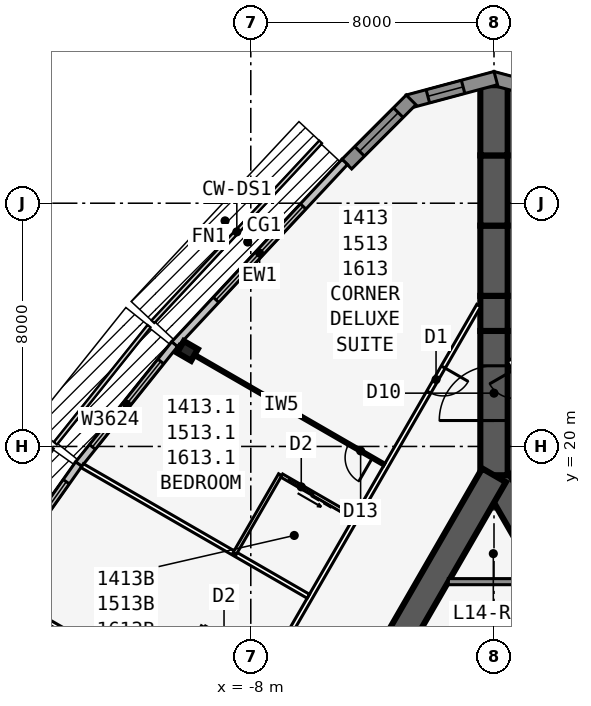
"""IFC4 building model, lengths in metres.
Left out: names, types, materials, properties, quantities, classifications, styles, units other than length and angle.
Written with IfcOpenShell. Run it as: python <this file> out.ifc"""

import sys

from ifc_helpers import new_model, si_unit, direction, frame, frame_2d, origin, origin_2d, place, context, subcontext, project, spatial, polyline, rectangle, i_section, outline, extrude, element, fill, save


model = new_model("IFC4")
c1 = context("Model", 3, precision=1e-05, world=origin(), true_north=direction((0.0, 1.0)))
c2 = subcontext(c1, "Body", "Model", "MODEL_VIEW")
j1 = project(units=[si_unit("LENGTHUNIT", "METRE"), si_unit("PLANEANGLEUNIT", "RADIAN")], contexts=[c1])
p1 = place(None, origin())
s1 = spatial("IfcSite", under=j1, at=p1, CompositionType="ELEMENT")
p2 = place(p1, origin())
s2 = spatial("IfcBuilding", under=s1, at=p2, CompositionType="ELEMENT")
p3 = place(p2, frame((0.0, 0.0, 59.1)))
s3 = spatial("IfcBuildingStorey", under=s2, at=p3, CompositionType="ELEMENT", Elevation=59.1)
p4 = place(p3, frame((16.5, -9.526, 0.0), z_axis=(0.0, 0.0, 1.0), x_axis=(-0.499999749417, 0.866025548458, 0.0)))
e1 = element("IfcWall", 1, at=p4, inside=s3, PredefinedType="SHEAR", context=c2, shape_type="SweptSolid", body=[
    extrude(rectangle(XDim=33.0, YDim=0.9, at=frame_2d((16.5, 0.0))), origin(), (0.0, 0.0, 1.0), 3.4),
])
p5 = place(p4, frame((14.15, 0.0, 0.0)))
e2 = element("IfcOpeningElement", 2, at=p5, cuts=e1, PredefinedType="OPENING", context=c2, shape_type="SweptSolid", body=[
    extrude(rectangle(XDim=1.8, YDim=2.13, at=frame_2d((0.9, 1.065))), frame((0.0, 0.46, 0.0), z_axis=(0.0, -1.0, 0.0), x_axis=(1.0, 0.0, 0.0)), (0.0, 0.0, 1.0), 0.92),
])
p6 = place(p4, frame((12.6, 0.0, 0.0)))
e3 = element("IfcOpeningElement", 3, at=p6, cuts=e1, PredefinedType="OPENING", context=c2, shape_type="SweptSolid", body=[
    extrude(rectangle(XDim=1.0, YDim=2.13, at=frame_2d((0.5, 1.065))), frame((0.0, 0.46, 0.0), z_axis=(0.0, -1.0, 0.0), x_axis=(1.0, 0.0, 0.0)), (0.0, 0.0, 1.0), 0.92),
])
p7 = place(p3, frame((0.0, 19.052, 0.0), z_axis=(0.0, 0.0, 1.0), x_axis=(-0.499999749417, -0.866025548458, 0.0)))
e4 = element("IfcWall", 4, at=p7, inside=s3, PredefinedType="SHEAR", context=c2, shape_type="SweptSolid", body=[
    extrude(rectangle(XDim=33.0, YDim=0.9, at=frame_2d((16.5, 0.0))), origin(), (0.0, 0.0, 1.0), 3.4),
])
p8 = place(p7, frame((14.15, 0.0, 0.0)))
e5 = element("IfcOpeningElement", 5, at=p8, cuts=e4, PredefinedType="OPENING", context=c2, shape_type="SweptSolid", body=[
    extrude(rectangle(XDim=1.8, YDim=2.13, at=frame_2d((0.9, 1.065))), frame((0.0, 0.46, 0.0), z_axis=(0.0, -1.0, 0.0), x_axis=(1.0, 0.0, 0.0)), (0.0, 0.0, 1.0), 0.92),
])
p9 = place(p7, frame((12.6, 0.0, 0.0)))
e6 = element("IfcOpeningElement", 6, at=p9, cuts=e4, PredefinedType="OPENING", context=c2, shape_type="SweptSolid", body=[
    extrude(rectangle(XDim=1.0, YDim=2.13, at=frame_2d((0.5, 1.065))), frame((0.0, 0.46, 0.0), z_axis=(0.0, -1.0, 0.0), x_axis=(1.0, 0.0, 0.0)), (0.0, 0.0, 1.0), 0.92),
])
p10 = place(p3, frame((0.0, 19.052, 0.0), z_axis=(0.0, 0.0, 1.0), x_axis=(0.0, 1.0, 0.0)))
e7 = element("IfcWall", 7, at=p10, inside=s3, PredefinedType="SHEAR", context=c2, shape_type="SweptSolid", body=[
    extrude(rectangle(XDim=4.746, YDim=0.9, at=frame_2d((2.373, 0.0))), origin(), (0.0, 0.0, 1.0), 3.4),
])
p11 = place(p10, frame((1.8, 0.0, 0.0)))
e8 = element("IfcOpeningElement", 8, at=p11, cuts=e7, PredefinedType="OPENING", context=c2, shape_type="SweptSolid", body=[
    extrude(rectangle(XDim=1.8, YDim=2.13, at=frame_2d((0.9, 1.065))), frame((0.0, 0.46, 0.0), z_axis=(0.0, -1.0, 0.0), x_axis=(1.0, 0.0, 0.0)), (0.0, 0.0, 1.0), 0.92),
])
p12 = place(p3, frame((0.0, 23.799, 0.0), z_axis=(0.0, 0.0, 1.0), x_axis=(0.0, 1.0, 0.0)))
e9 = element("IfcWall", 9, at=p12, inside=s3, PredefinedType="SHEAR", context=c2, shape_type="SweptSolid", body=[
    extrude(rectangle(XDim=1.155, YDim=0.9, at=frame_2d((0.577, 0.0))), origin(), (0.0, 0.0, 1.0), 3.4),
])
p13 = place(p3, frame((0.0, 24.953, 0.0), z_axis=(0.0, 0.0, 1.0), x_axis=(0.0, 1.0, 0.0)))
e10 = element("IfcWall", 10, at=p13, inside=s3, PredefinedType="SHEAR", context=c2, shape_type="SweptSolid", body=[
    extrude(rectangle(XDim=2.309, YDim=0.9, at=frame_2d((1.155, 0.0))), origin(), (0.0, 0.0, 1.0), 3.4),
])
p14 = place(p3, frame((0.0, 27.263, 0.0), z_axis=(0.0, 0.0, 1.0), x_axis=(0.0, 1.0, 0.0)))
e11 = element("IfcWall", 11, at=p14, inside=s3, PredefinedType="SHEAR", context=c2, shape_type="SweptSolid", body=[
    extrude(rectangle(XDim=2.31, YDim=0.9, at=frame_2d((1.155, 0.0))), origin(), (0.0, 0.0, 1.0), 3.4),
])
p15 = place(p3, frame((0.0, 29.572, 0.0), z_axis=(0.0, 0.0, 1.0), x_axis=(0.0, 1.0, 0.0)))
e12 = element("IfcWall", 12, at=p15, inside=s3, PredefinedType="SHEAR", context=c2, shape_type="SweptSolid", body=[
    extrude(rectangle(XDim=2.309, YDim=0.9, at=frame_2d((1.155, 0.0))), origin(), (0.0, 0.0, 1.0), 3.4),
])
p16 = place(p3, frame((-10.083, 23.142, 0.0), z_axis=(0.0, 0.0, 1.0), x_axis=(-0.5, -0.866025403784, 0.0)))
e13 = element("IfcColumn", 13, at=p16, inside=s3, PredefinedType="COLUMN", context=c2, shape_type="SweptSolid", body=[
    extrude(i_section(OverallWidth=0.442, OverallDepth=0.531, WebThickness=0.066, FlangeThickness=0.106, at=origin_2d()), origin(), (0.0, 0.0, 1.0), 3.4),
])
p17 = place(p3, frame((2.829, 31.341, 0.0), z_axis=(0.0, 0.0, 1.0), x_axis=(-0.965930548995, 0.258801419081, 0.0)))
e14 = element("IfcWall", 14, at=p17, inside=s3, PredefinedType="SOLIDWALL", context=c2, shape_type="SweptSolid", body=[
    extrude(outline(polyline([(2.989, 0.225), (2.929, 0.225), (2.438, 0.093), (2.402, 0.225), (0.0, 0.225), (0.0, -0.225), (2.989, -0.225), (2.989, 0.225)])), origin(), (0.0, 0.0, 1.0), 3.235),
])
p18 = place(p17, frame((0.676, 0.0, 0.45)))
e15 = element("IfcOpeningElement", 15, at=p18, cuts=e14, PredefinedType="OPENING", context=c2, shape_type="SweptSolid", body=[
    extrude(rectangle(XDim=1.2, YDim=2.4, at=frame_2d((0.6, 1.2))), frame((0.0, 0.235, 0.0), z_axis=(0.0, -1.0, 0.0), x_axis=(1.0, 0.0, 0.0)), (0.0, 0.0, 1.0), 0.47),
])
p19 = place(p3, frame((0.058, 32.114, 0.0), z_axis=(0.0, 0.0, 1.0), x_axis=(-0.965930548995, -0.258801419081, 0.0)))
e16 = element("IfcWall", 16, at=p19, inside=s3, PredefinedType="SOLIDWALL", context=c2, shape_type="SweptSolid", body=[
    extrude(outline(polyline([(2.989, 0.225), (0.586, 0.225), (0.551, 0.093), (0.059, 0.225), (0.0, 0.225), (0.0, -0.225), (2.989, -0.225), (2.989, 0.225)])), origin(), (0.0, 0.0, 1.0), 3.235),
])
p20 = place(p19, frame((1.113, 0.0, 0.45)))
e17 = element("IfcOpeningElement", 17, at=p20, cuts=e16, PredefinedType="OPENING", context=c2, shape_type="SweptSolid", body=[
    extrude(rectangle(XDim=1.2, YDim=2.4, at=frame_2d((0.6, 1.2))), frame((0.0, 0.235, 0.0), z_axis=(0.0, -1.0, 0.0), x_axis=(1.0, 0.0, 0.0)), (0.0, 0.0, 1.0), 0.47),
])
p21 = place(p3, frame((-2.728, 31.399, 0.0), z_axis=(0.0, 0.0, 1.0), x_axis=(-0.707106781187, -0.707106781187, 0.0)))
e18 = element("IfcWall", 18, at=p21, inside=s3, PredefinedType="SOLIDWALL", context=c2, shape_type="SweptSolid", body=[
    extrude(rectangle(XDim=2.988, YDim=0.45, at=frame_2d((1.494, 0.0))), origin(), (0.0, 0.0, 1.0), 3.235),
])
p22 = place(p21, frame((0.594, 0.0, 0.45)))
e19 = element("IfcOpeningElement", 19, at=p22, cuts=e18, PredefinedType="OPENING", context=c2, shape_type="SweptSolid", body=[
    extrude(rectangle(XDim=1.8, YDim=2.4, at=frame_2d((0.9, 1.2))), frame((0.0, 0.235, 0.0), z_axis=(0.0, -1.0, 0.0), x_axis=(1.0, 0.0, 0.0)), (0.0, 0.0, 1.0), 0.47),
])
p23 = place(p3, frame((-4.909, 29.36, 0.0), z_axis=(0.0, 0.0, 1.0), x_axis=(-0.682289646561, -0.731081964075, 0.0)))
e20 = element("IfcWall", 20, at=p23, inside=s3, PredefinedType="STANDARD", context=c2, shape_type="SweptSolid", body=[
    extrude(rectangle(XDim=8.211, YDim=0.25, at=frame_2d((4.105, 0.0))), origin(), (0.0, 0.0, 1.0), 3.235),
])
p24 = place(p23, frame((2.006, 0.0, 0.45)))
e21 = element("IfcOpeningElement", 21, at=p24, cuts=e20, PredefinedType="OPENING", context=c2, shape_type="SweptSolid", body=[
    extrude(rectangle(XDim=4.2, YDim=2.4, at=frame_2d((2.1, 1.2))), frame((0.0, 0.135, 0.0), z_axis=(0.0, -1.0, 0.0), x_axis=(1.0, 0.0, 0.0)), (0.0, 0.0, 1.0), 0.27),
])
p25 = place(p3, frame((-10.505, 23.364, 0.0), z_axis=(0.0, 0.0, 1.0), x_axis=(-0.624594965756, -0.780948864364, 0.0)))
e22 = element("IfcWall", 22, at=p25, inside=s3, PredefinedType="STANDARD", context=c2, shape_type="SweptSolid", body=[
    extrude(rectangle(XDim=5.058, YDim=0.25, at=frame_2d((2.529, 0.0))), origin(), (0.0, 0.0, 1.0), 3.235),
])
p26 = place(p25, frame((0.729, 0.0, 0.45)))
e23 = element("IfcOpeningElement", 23, at=p26, cuts=e22, PredefinedType="OPENING", context=c2, shape_type="SweptSolid", body=[
    extrude(rectangle(XDim=3.6, YDim=2.4, at=frame_2d((1.8, 1.2))), frame((0.0, 0.135, 0.0), z_axis=(0.0, -1.0, 0.0), x_axis=(1.0, 0.0, 0.0)), (0.0, 0.0, 1.0), 0.27),
])
p27 = place(p3, frame((-13.659, 19.42, 0.0), z_axis=(0.0, 0.0, 1.0), x_axis=(-0.5766431066, -0.81699616132, 0.0)))
e24 = element("IfcWall", 24, at=p27, inside=s3, PredefinedType="STANDARD", context=c2, shape_type="SweptSolid", body=[
    extrude(rectangle(XDim=5.021, YDim=0.25, at=frame_2d((2.51, 0.0))), origin(), (0.0, 0.0, 1.0), 3.235),
])
p28 = place(p27, frame((0.71, 0.0, 0.45)))
e25 = element("IfcOpeningElement", 25, at=p28, cuts=e24, PredefinedType="OPENING", context=c2, shape_type="SweptSolid", body=[
    extrude(rectangle(XDim=3.6, YDim=2.4, at=frame_2d((1.8, 1.2))), frame((0.0, 0.135, 0.0), z_axis=(0.0, -1.0, 0.0), x_axis=(1.0, 0.0, 0.0)), (0.0, 0.0, 1.0), 0.27),
])
p29 = place(p3, frame((20.027, -10.985, 0.0), z_axis=(0.0, 0.0, 1.0), x_axis=(-0.500001677587, 0.866024435227, 0.0)))
e26 = element("IfcWall", 26, at=p29, inside=s3, PredefinedType="PARTITIONING", context=c2, shape_type="SweptSolid", body=[
    extrude(rectangle(XDim=39.054, YDim=0.15, at=frame_2d((19.527, 0.0))), origin(), (0.0, 0.0, 1.0), 3.235),
])
p30 = place(p29, frame((0.352, 0.0, 0.0)))
e27 = element("IfcOpeningElement", 27, at=p30, cuts=e26, PredefinedType="OPENING", context=c2, shape_type="SweptSolid", body=[
    extrude(rectangle(XDim=0.95, YDim=2.13, at=frame_2d((0.475, 1.065))), frame((0.0, 0.085, 0.0), z_axis=(0.0, -1.0, 0.0), x_axis=(1.0, 0.0, 0.0)), (0.0, 0.0, 1.0), 0.17),
])
p31 = place(p29, frame((10.352, 0.0, 0.0)))
e28 = element("IfcOpeningElement", 28, at=p31, cuts=e26, PredefinedType="OPENING", context=c2, shape_type="SweptSolid", body=[
    extrude(rectangle(XDim=0.95, YDim=2.13, at=frame_2d((0.475, 1.065))), frame((0.0, 0.085, 0.0), z_axis=(0.0, -1.0, 0.0), x_axis=(1.0, 0.0, 0.0)), (0.0, 0.0, 1.0), 0.17),
])
p32 = place(p29, frame((17.152, 0.0, 0.0)))
e29 = element("IfcOpeningElement", 29, at=p32, cuts=e26, PredefinedType="OPENING", context=c2, shape_type="SweptSolid", body=[
    extrude(rectangle(XDim=0.95, YDim=2.13, at=frame_2d((0.475, 1.065))), frame((0.0, 0.085, 0.0), z_axis=(0.0, -1.0, 0.0), x_axis=(1.0, 0.0, 0.0)), (0.0, 0.0, 1.0), 0.17),
])
p33 = place(p29, frame((20.952, 0.0, 0.0)))
e30 = element("IfcOpeningElement", 30, at=p33, cuts=e26, PredefinedType="OPENING", context=c2, shape_type="SweptSolid", body=[
    extrude(rectangle(XDim=0.95, YDim=2.13, at=frame_2d((0.475, 1.065))), frame((0.0, 0.085, 0.0), z_axis=(0.0, -1.0, 0.0), x_axis=(1.0, 0.0, 0.0)), (0.0, 0.0, 1.0), 0.17),
])
p34 = place(p29, frame((27.752, 0.0, 0.0)))
e31 = element("IfcOpeningElement", 31, at=p34, cuts=e26, PredefinedType="OPENING", context=c2, shape_type="SweptSolid", body=[
    extrude(rectangle(XDim=0.95, YDim=2.13, at=frame_2d((0.475, 1.065))), frame((0.0, 0.085, 0.0), z_axis=(0.0, -1.0, 0.0), x_axis=(1.0, 0.0, 0.0)), (0.0, 0.0, 1.0), 0.17),
])
p35 = place(p29, frame((37.752, 0.0, 0.0)))
e32 = element("IfcOpeningElement", 32, at=p35, cuts=e26, PredefinedType="OPENING", context=c2, shape_type="SweptSolid", body=[
    extrude(rectangle(XDim=0.95, YDim=2.13, at=frame_2d((0.475, 1.065))), frame((0.0, 0.085, 0.0), z_axis=(0.0, -1.0, 0.0), x_axis=(1.0, 0.0, 0.0)), (0.0, 0.0, 1.0), 0.17),
])
p36 = place(p3, frame((-0.5, 24.636, 0.0), z_axis=(0.0, 0.0, 1.0), x_axis=(-0.500001915564, -0.86602429783, 0.0)))
e33 = element("IfcWall", 33, at=p36, inside=s3, PredefinedType="PARTITIONING", context=c2, shape_type="SweptSolid", body=[
    extrude(rectangle(XDim=42.172, YDim=0.15, at=frame_2d((21.086, 0.0))), origin(), (0.0, 0.0, 1.0), 3.235),
])
p37 = place(p36, frame((2.338, 0.0, 0.0)))
e34 = element("IfcOpeningElement", 34, at=p37, cuts=e33, PredefinedType="OPENING", context=c2, shape_type="SweptSolid", body=[
    extrude(rectangle(XDim=0.95, YDim=2.13, at=frame_2d((0.475, 1.065))), frame((0.0, 0.085, 0.0), z_axis=(0.0, -1.0, 0.0), x_axis=(1.0, 0.0, 0.0)), (0.0, 0.0, 1.0), 0.17),
])
p38 = place(p36, frame((12.511, 0.0, 0.0)))
e35 = element("IfcOpeningElement", 35, at=p38, cuts=e33, PredefinedType="OPENING", context=c2, shape_type="SweptSolid", body=[
    extrude(rectangle(XDim=0.95, YDim=2.13, at=frame_2d((0.475, 1.065))), frame((0.0, 0.085, 0.0), z_axis=(0.0, -1.0, 0.0), x_axis=(1.0, 0.0, 0.0)), (0.0, 0.0, 1.0), 0.17),
])
p39 = place(p36, frame((19.311, 0.0, 0.0)))
e36 = element("IfcOpeningElement", 36, at=p39, cuts=e33, PredefinedType="OPENING", context=c2, shape_type="SweptSolid", body=[
    extrude(rectangle(XDim=0.95, YDim=2.13, at=frame_2d((0.475, 1.065))), frame((0.0, 0.085, 0.0), z_axis=(0.0, -1.0, 0.0), x_axis=(1.0, 0.0, 0.0)), (0.0, 0.0, 1.0), 0.17),
])
p40 = place(p36, frame((28.111, 0.0, 0.0)))
e37 = element("IfcOpeningElement", 37, at=p40, cuts=e33, PredefinedType="OPENING", context=c2, shape_type="SweptSolid", body=[
    extrude(rectangle(XDim=0.95, YDim=2.13, at=frame_2d((0.475, 1.065))), frame((0.0, 0.085, 0.0), z_axis=(0.0, -1.0, 0.0), x_axis=(1.0, 0.0, 0.0)), (0.0, 0.0, 1.0), 0.17),
])
p41 = place(p36, frame((39.311, 0.0, 0.0)))
e38 = element("IfcOpeningElement", 38, at=p41, cuts=e33, PredefinedType="OPENING", context=c2, shape_type="SweptSolid", body=[
    extrude(rectangle(XDim=0.95, YDim=2.13, at=frame_2d((0.475, 1.065))), frame((0.0, 0.085, 0.0), z_axis=(0.0, -1.0, 0.0), x_axis=(1.0, 0.0, 0.0)), (0.0, 0.0, 1.0), 0.17),
])
p42 = place(p3, frame((-3.608, 19.404, 0.0), z_axis=(0.0, 0.0, 1.0), x_axis=(-0.866021300503, 0.500007107024, 0.0)))
e39 = element("IfcWall", 39, at=p42, inside=s3, PredefinedType="PARTITIONING", context=c2, shape_type="SweptSolid", body=[
    extrude(rectangle(XDim=7.82, YDim=0.1, at=frame_2d((3.91, 0.0))), origin(), (0.0, 0.0, 1.0), 2.389),
])
p43 = place(p42, frame((0.45, 0.0, 0.0)))
e40 = element("IfcOpeningElement", 40, at=p43, cuts=e39, PredefinedType="OPENING", context=c2, shape_type="SweptSolid", body=[
    extrude(rectangle(XDim=0.9, YDim=2.13, at=frame_2d((0.45, 1.065))), frame((0.0, 0.06, 0.0), z_axis=(0.0, -1.0, 0.0), x_axis=(1.0, 0.0, 0.0)), (0.0, 0.0, 1.0), 0.12),
])
p44 = place(p3, frame((-6.108, 15.073, 0.0), z_axis=(0.0, 0.0, 1.0), x_axis=(-0.866031196456, 0.499989966665, 0.0)))
e41 = element("IfcWall", 41, at=p44, inside=s3, PredefinedType="PARTITIONING", context=c2, shape_type="SweptSolid", body=[
    extrude(rectangle(XDim=8.585, YDim=0.15, at=frame_2d((4.292, 0.0))), origin(), (0.0, 0.0, 1.0), 2.389),
])
p45 = place(p3, frame((-8.608, 10.743, 0.0), z_axis=(0.0, 0.0, 1.0), x_axis=(-0.866028232062, 0.499995101247, 0.0)))
e42 = element("IfcWall", 42, at=p45, inside=s3, PredefinedType="PARTITIONING", context=c2, shape_type="SweptSolid", body=[
    extrude(rectangle(XDim=9.043, YDim=0.15, at=frame_2d((4.521, 0.0))), origin(), (0.0, 0.0, 1.0), 2.389),
])
p46 = place(p3, frame((-7.033, 19.072, 0.0), z_axis=(0.0, 0.0, 1.0), x_axis=(-0.499990139034, -0.866031096941, 0.0)))
e43 = element("IfcWall", 43, at=p46, inside=s3, PredefinedType="PLUMBINGWALL", context=c2, shape_type="SweptSolid", body=[
    extrude(rectangle(XDim=3.0, YDim=0.12, at=frame_2d((1.5, 0.0))), origin(), (0.0, 0.0, 1.0), 3.235),
])
p47 = place(p3, frame((-4.608, 17.671, 0.0), z_axis=(0.0, 0.0, 1.0), x_axis=(-0.865997131366, 0.500048966069, 0.0)))
e44 = element("IfcWall", 44, at=p47, inside=s3, PredefinedType="PLUMBINGWALL", context=c2, shape_type="SweptSolid", body=[
    extrude(rectangle(XDim=2.74, YDim=0.12, at=frame_2d((1.37, 0.0))), origin(), (0.0, 0.0, 1.0), 3.235),
])
p48 = place(p47, frame((1.55, 0.0, 0.0)))
e45 = element("IfcOpeningElement", 45, at=p48, cuts=e44, PredefinedType="OPENING", context=c2, shape_type="SweptSolid", body=[
    extrude(rectangle(XDim=0.9, YDim=2.13, at=frame_2d((0.45, 1.065))), frame((0.0, 0.07, 0.0), z_axis=(0.0, -1.0, 0.0), x_axis=(1.0, 0.0, 0.0)), (0.0, 0.0, 1.0), 0.14),
])
p49 = place(p3, frame((-9.573, 14.072, 0.0), z_axis=(0.0, 0.0, 1.0), x_axis=(-0.500001309137, -0.866024647952, 0.0)))
e46 = element("IfcWall", 46, at=p49, inside=s3, PredefinedType="PLUMBINGWALL", context=c2, shape_type="SweptSolid", body=[
    extrude(rectangle(XDim=2.4, YDim=0.12, at=frame_2d((1.2, 0.0))), origin(), (0.0, 0.0, 1.0), 3.235),
])
p50 = place(p3, frame((-7.408, 12.822, 0.0), z_axis=(0.0, 0.0, 1.0), x_axis=(-0.866023955769, 0.500002508028, 0.0)))
e47 = element("IfcWall", 47, at=p50, inside=s3, PredefinedType="PLUMBINGWALL", context=c2, shape_type="SweptSolid", body=[
    extrude(rectangle(XDim=2.44, YDim=0.12, at=frame_2d((1.22, 0.0))), origin(), (0.0, 0.0, 1.0), 3.235),
])
p51 = place(p50, frame((1.25, 0.0, 0.0)))
e48 = element("IfcOpeningElement", 48, at=p51, cuts=e47, PredefinedType="OPENING", context=c2, shape_type="SweptSolid", body=[
    extrude(rectangle(XDim=0.9, YDim=2.13, at=frame_2d((0.45, 1.065))), frame((0.0, 0.07, 0.0), z_axis=(0.0, -1.0, 0.0), x_axis=(1.0, 0.0, 0.0)), (0.0, 0.0, 1.0), 0.14),
])
p52 = place(p3, frame((-1.501, 15.552, 0.0), z_axis=(0.0, 0.0, 1.0), x_axis=(1.0, 0.0, 0.0)))
e49 = element("IfcWall", 49, at=p52, inside=s3, PredefinedType="SOLIDWALL", context=c2, shape_type="SweptSolid", body=[
    extrude(rectangle(XDim=3.002, YDim=0.2, at=frame_2d((1.501, 0.0))), origin(), (0.0, 0.0, 1.0), 3.235),
])
p53 = place(p20, origin())
e50 = element("IfcWindow", 50, at=p53, inside=s3, PartitioningType="SINGLE_PANEL", PredefinedType="WINDOW", context=c2, shape_type="SweptSolid", body=[
    extrude(rectangle(XDim=1.2, YDim=2.4, at=frame_2d((0.6, 1.2))), frame((0.0, 0.03, 0.0), z_axis=(0.0, -1.0, 0.0), x_axis=(1.0, 0.0, 0.0)), (0.0, 0.0, 1.0), 0.06),
])
fill(e17, e50)
p54 = place(p22, origin())
e51 = element("IfcWindow", 51, at=p54, inside=s3, PartitioningType="SINGLE_PANEL", PredefinedType="WINDOW", context=c2, shape_type="SweptSolid", body=[
    extrude(rectangle(XDim=1.8, YDim=2.4, at=frame_2d((0.9, 1.2))), frame((0.0, 0.03, 0.0), z_axis=(0.0, -1.0, 0.0), x_axis=(1.0, 0.0, 0.0)), (0.0, 0.0, 1.0), 0.06),
])
fill(e19, e51)
p55 = place(p24, origin())
e52 = element("IfcWindow", 52, at=p55, inside=s3, PartitioningType="SINGLE_PANEL", PredefinedType="WINDOW", context=c2, shape_type="SweptSolid", body=[
    extrude(rectangle(XDim=4.2, YDim=2.4, at=frame_2d((2.1, 1.2))), frame((0.0, 0.03, 0.0), z_axis=(0.0, -1.0, 0.0), x_axis=(1.0, 0.0, 0.0)), (0.0, 0.0, 1.0), 0.06),
])
fill(e21, e52)
p56 = place(p26, origin())
e53 = element("IfcWindow", 53, at=p56, inside=s3, PartitioningType="SINGLE_PANEL", PredefinedType="WINDOW", context=c2, shape_type="SweptSolid", body=[
    extrude(rectangle(XDim=3.6, YDim=2.4, at=frame_2d((1.8, 1.2))), frame((0.0, 0.03, 0.0), z_axis=(0.0, -1.0, 0.0), x_axis=(1.0, 0.0, 0.0)), (0.0, 0.0, 1.0), 0.06),
])
fill(e23, e53)
p57 = place(p28, origin())
e54 = element("IfcWindow", 54, at=p57, inside=s3, PartitioningType="SINGLE_PANEL", PredefinedType="WINDOW", context=c2, shape_type="SweptSolid", body=[
    extrude(rectangle(XDim=3.6, YDim=2.4, at=frame_2d((1.8, 1.2))), frame((0.0, 0.03, 0.0), z_axis=(0.0, -1.0, 0.0), x_axis=(1.0, 0.0, 0.0)), (0.0, 0.0, 1.0), 0.06),
])
fill(e25, e54)
p58 = place(p43, origin())
e55 = element("IfcDoor", 55, at=p58, inside=s3, OperationType="SINGLE_SWING_LEFT", PredefinedType="DOOR", context=c2, shape_type="SweptSolid", body=[
    extrude(rectangle(XDim=0.9, YDim=2.13, at=frame_2d((0.45, 1.065))), frame((0.0, 0.025, 0.0), z_axis=(0.0, -1.0, 0.0), x_axis=(1.0, 0.0, 0.0)), (0.0, 0.0, 1.0), 0.05),
])
fill(e40, e55)
p59 = place(p37, origin())
e56 = element("IfcDoor", 56, at=p59, inside=s3, OperationType="SINGLE_SWING_LEFT", PredefinedType="DOOR", context=c2, shape_type="SweptSolid", body=[
    extrude(rectangle(XDim=0.95, YDim=2.13, at=frame_2d((0.475, 1.065))), frame((0.0, 0.025, 0.0), z_axis=(0.0, -1.0, 0.0), x_axis=(1.0, 0.0, 0.0)), (0.0, 0.0, 1.0), 0.05),
])
fill(e34, e56)
p60 = place(p48, origin())
e57 = element("IfcDoor", 57, at=p60, inside=s3, OperationType="SLIDING_TO_LEFT", PredefinedType="DOOR", context=c2, shape_type="SweptSolid", body=[
    extrude(rectangle(XDim=0.9, YDim=2.13, at=frame_2d((0.45, 1.065))), frame((0.0, 0.025, 0.0), z_axis=(0.0, -1.0, 0.0), x_axis=(1.0, 0.0, 0.0)), (0.0, 0.0, 1.0), 0.05),
])
fill(e45, e57)
p61 = place(p11, origin())
e58 = element("IfcDoor", 58, at=p61, inside=s3, OperationType="DOUBLE_DOOR_DOUBLE_SWING", PredefinedType="DOOR", context=c2, shape_type="SweptSolid", body=[
    extrude(rectangle(XDim=1.8, YDim=2.13, at=frame_2d((0.9, 1.065))), frame((0.0, 0.025, 0.0), z_axis=(0.0, -1.0, 0.0), x_axis=(1.0, 0.0, 0.0)), (0.0, 0.0, 1.0), 0.05),
])
fill(e8, e58)
save(model, sys.argv[1])
